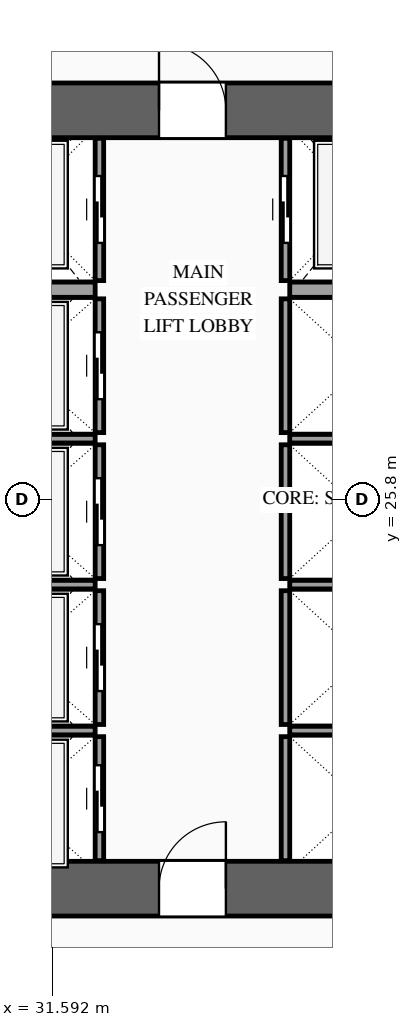
"""IFC4 building model, lengths in metres.
Left out: names, types, materials, properties, quantities, classifications, styles, units other than length and angle.
Written with IfcOpenShell. Run it as: python <this file> out.ifc"""

import sys

from ifc_helpers import new_model, si_unit, direction, frame, frame_2d, origin, place, context, subcontext, project, spatial, rectangle, extrude, source, transform, mapped, element, fill, save


model = new_model("IFC4")
c1 = context("Model", 3, precision=1e-05, world=origin(), true_north=direction((0.0, 1.0)))
c2 = subcontext(c1, "Body", "Model", "MODEL_VIEW")
j1 = project(units=[si_unit("LENGTHUNIT", "METRE"), si_unit("PLANEANGLEUNIT", "RADIAN")], contexts=[c1])
p1 = place(None, origin())
s1 = spatial("IfcSite", under=j1, at=p1, CompositionType="ELEMENT")
p2 = place(p1, origin())
s2 = spatial("IfcBuilding", under=s1, at=p2, CompositionType="ELEMENT")
p3 = place(p2, frame((0.0, 0.0, 34.2)))
s3 = spatial("IfcBuildingStorey", under=s2, at=p3, CompositionType="ELEMENT", Elevation=34.2)
p4 = place(p3, frame((23.35, 19.4, 0.0), z_axis=(0.0, 0.0, 1.0), x_axis=(1.0, 0.0, 0.0)))
e1 = element("IfcWall", 1, at=p4, inside=s3, PredefinedType="SHEAR", context=c2, shape_type="SweptSolid", body=[
    extrude(rectangle(XDim=27.3, YDim=0.9, at=frame_2d((13.65, 0.0))), origin(), (0.0, 0.0, 1.0), 3.6),
])
p5 = place(p4, frame((2.1, 0.0, 0.0)))
e2 = element("IfcOpeningElement", 2, at=p5, cuts=e1, PredefinedType="OPENING", context=c2, shape_type="SweptSolid", body=[
    extrude(rectangle(XDim=1.1, YDim=2.2, at=frame_2d((0.55, 1.1))), frame((0.0, 0.465, 0.0), z_axis=(0.0, -1.0, 0.0), x_axis=(1.0, 0.0, 0.0)), (0.0, 0.0, 1.0), 0.93),
])
p6 = place(p4, frame((10.0, 0.0, 0.0)))
e3 = element("IfcOpeningElement", 3, at=p6, cuts=e1, PredefinedType="OPENING", context=c2, shape_type="SweptSolid", body=[
    extrude(rectangle(XDim=1.1, YDim=2.2, at=frame_2d((0.55, 1.1))), frame((0.0, 0.465, 0.0), z_axis=(0.0, -1.0, 0.0), x_axis=(1.0, 0.0, 0.0)), (0.0, 0.0, 1.0), 0.93),
])
p7 = place(p4, frame((23.2, 0.0, 0.0)))
e4 = element("IfcOpeningElement", 4, at=p7, cuts=e1, PredefinedType="OPENING", context=c2, shape_type="SweptSolid", body=[
    extrude(rectangle(XDim=1.1, YDim=2.2, at=frame_2d((0.55, 1.1))), frame((0.0, 0.465, 0.0), z_axis=(0.0, -1.0, 0.0), x_axis=(1.0, 0.0, 0.0)), (0.0, 0.0, 1.0), 0.93),
])
p8 = place(p4, frame((19.82, 0.0, 0.0)))
e5 = element("IfcOpeningElement", 5, at=p8, cuts=e1, PredefinedType="OPENING", context=c2, shape_type="SweptSolid", body=[
    extrude(rectangle(XDim=0.9, YDim=2.15, at=frame_2d((0.45, 1.075))), frame((0.0, 0.465, 0.0), z_axis=(0.0, -1.0, 0.0), x_axis=(1.0, 0.0, 0.0)), (0.0, 0.0, 1.0), 0.93),
])
p9 = place(p4, frame((18.38, 0.0, 0.0)))
e6 = element("IfcOpeningElement", 6, at=p9, cuts=e1, PredefinedType="OPENING", context=c2, shape_type="SweptSolid", body=[
    extrude(rectangle(XDim=0.9, YDim=2.15, at=frame_2d((0.45, 1.075))), frame((0.0, 0.465, 0.0), z_axis=(0.0, -1.0, 0.0), x_axis=(1.0, 0.0, 0.0)), (0.0, 0.0, 1.0), 0.93),
])
p10 = place(p3, frame((23.35, 32.2, 0.0), z_axis=(0.0, 0.0, 1.0), x_axis=(1.0, 0.0, 0.0)))
e7 = element("IfcWall", 7, at=p10, inside=s3, PredefinedType="SHEAR", context=c2, shape_type="SweptSolid", body=[
    extrude(rectangle(XDim=27.3, YDim=0.9, at=frame_2d((13.65, 0.0))), origin(), (0.0, 0.0, 1.0), 3.6),
])
p11 = place(p10, frame((4.72, 0.0, 0.0)))
e8 = element("IfcOpeningElement", 8, at=p11, cuts=e7, PredefinedType="OPENING", context=c2, shape_type="SweptSolid", body=[
    extrude(rectangle(XDim=0.9, YDim=2.15, at=frame_2d((0.45, 1.075))), frame((0.0, 0.465, 0.0), z_axis=(0.0, -1.0, 0.0), x_axis=(1.0, 0.0, 0.0)), (0.0, 0.0, 1.0), 0.93),
])
p12 = place(p10, frame((10.0, 0.0, 0.0)))
e9 = element("IfcOpeningElement", 9, at=p12, cuts=e7, PredefinedType="OPENING", context=c2, shape_type="SweptSolid", body=[
    extrude(rectangle(XDim=1.1, YDim=2.2, at=frame_2d((0.55, 1.1))), frame((0.0, 0.465, 0.0), z_axis=(0.0, -1.0, 0.0), x_axis=(1.0, 0.0, 0.0)), (0.0, 0.0, 1.0), 0.93),
])
p13 = place(p10, frame((15.85, 0.0, 0.0)))
e10 = element("IfcOpeningElement", 10, at=p13, cuts=e7, PredefinedType="OPENING", context=c2, shape_type="SweptSolid", body=[
    extrude(rectangle(XDim=1.1, YDim=2.2, at=frame_2d((0.55, 1.1))), frame((0.0, 0.465, 0.0), z_axis=(0.0, -1.0, 0.0), x_axis=(1.0, 0.0, 0.0)), (0.0, 0.0, 1.0), 0.93),
])
p14 = place(p3, frame((32.37, 19.86, 0.0), z_axis=(0.0, 0.0, 1.0), x_axis=(0.0, 1.0, 0.0)))
e11 = element("IfcWall", 11, at=p14, inside=s3, PredefinedType="SOLIDWALL", context=c2, shape_type="SweptSolid", body=[
    extrude(rectangle(XDim=2.04, YDim=0.14, at=frame_2d((1.02, 0.0))), origin(), (0.0, 0.0, 1.0), 3.38),
])
p15 = place(p14, frame((0.47, 0.0, 0.0)))
e12 = element("IfcOpeningElement", 12, at=p15, cuts=e11, PredefinedType="OPENING", context=c2, shape_type="SweptSolid", body=[
    extrude(rectangle(XDim=1.1, YDim=2.2, at=frame_2d((0.55, 1.1))), frame((0.0, 0.085, 0.0), z_axis=(0.0, -1.0, 0.0), x_axis=(1.0, 0.0, 0.0)), (0.0, 0.0, 1.0), 0.17),
])
m1 = source(origin(), c2, "Body", "SweptSolid", [
    extrude(rectangle(XDim=2.5, YDim=0.14, at=frame_2d((1.25, 0.0))), origin(), (0.0, 0.0, 1.0), 3.38),
])
p16 = place(p3, frame((29.8, 22.0, 0.0), z_axis=(0.0, 0.0, 1.0), x_axis=(1.0, 0.0, 0.0)))
e13 = element("IfcWall", 13, at=p16, inside=s3, PredefinedType="SOLIDWALL", context=c2, shape_type="MappedRepresentation", body=[
    mapped(m1, transform((0.0, 0.0, 0.0), scale=1.0)),
])
p17 = place(p3, frame((32.37, 22.1, 0.0), z_axis=(0.0, 0.0, 1.0), x_axis=(0.0, 1.0, 0.0)))
e14 = element("IfcWall", 14, at=p17, inside=s3, PredefinedType="SOLIDWALL", context=c2, shape_type="SweptSolid", body=[
    extrude(rectangle(XDim=2.2, YDim=0.14, at=frame_2d((1.1, 0.0))), origin(), (0.0, 0.0, 1.0), 3.38),
])
p18 = place(p17, frame((0.55, 0.0, 0.0)))
e15 = element("IfcOpeningElement", 15, at=p18, cuts=e14, PredefinedType="OPENING", context=c2, shape_type="SweptSolid", body=[
    extrude(rectangle(XDim=1.1, YDim=2.2, at=frame_2d((0.55, 1.1))), frame((0.0, 0.085, 0.0), z_axis=(0.0, -1.0, 0.0), x_axis=(1.0, 0.0, 0.0)), (0.0, 0.0, 1.0), 0.17),
])
p19 = place(p3, frame((29.8, 24.4, 0.0), z_axis=(0.0, 0.0, 1.0), x_axis=(1.0, 0.0, 0.0)))
e16 = element("IfcWall", 16, at=p19, inside=s3, PredefinedType="SOLIDWALL", context=c2, shape_type="MappedRepresentation", body=[
    mapped(m1, transform((0.0, 0.0, 0.0), scale=1.0)),
])
p20 = place(p3, frame((32.37, 24.5, 0.0), z_axis=(0.0, 0.0, 1.0), x_axis=(0.0, 1.0, 0.0)))
e17 = element("IfcWall", 17, at=p20, inside=s3, PredefinedType="SOLIDWALL", context=c2, shape_type="SweptSolid", body=[
    extrude(rectangle(XDim=2.2, YDim=0.14, at=frame_2d((1.1, 0.0))), origin(), (0.0, 0.0, 1.0), 3.38),
])
p21 = place(p20, frame((0.55, 0.0, 0.0)))
e18 = element("IfcOpeningElement", 18, at=p21, cuts=e17, PredefinedType="OPENING", context=c2, shape_type="SweptSolid", body=[
    extrude(rectangle(XDim=1.1, YDim=2.2, at=frame_2d((0.55, 1.1))), frame((0.0, 0.085, 0.0), z_axis=(0.0, -1.0, 0.0), x_axis=(1.0, 0.0, 0.0)), (0.0, 0.0, 1.0), 0.17),
])
p22 = place(p3, frame((29.8, 26.8, 0.0), z_axis=(0.0, 0.0, 1.0), x_axis=(1.0, 0.0, 0.0)))
e19 = element("IfcWall", 19, at=p22, inside=s3, PredefinedType="SOLIDWALL", context=c2, shape_type="MappedRepresentation", body=[
    mapped(m1, transform((0.0, 0.0, 0.0), scale=1.0)),
])
p23 = place(p3, frame((32.37, 26.9, 0.0), z_axis=(0.0, 0.0, 1.0), x_axis=(0.0, 1.0, 0.0)))
e20 = element("IfcWall", 20, at=p23, inside=s3, PredefinedType="SOLIDWALL", context=c2, shape_type="SweptSolid", body=[
    extrude(rectangle(XDim=2.2, YDim=0.14, at=frame_2d((1.1, 0.0))), origin(), (0.0, 0.0, 1.0), 3.38),
])
p24 = place(p23, frame((0.55, 0.0, 0.0)))
e21 = element("IfcOpeningElement", 21, at=p24, cuts=e20, PredefinedType="OPENING", context=c2, shape_type="SweptSolid", body=[
    extrude(rectangle(XDim=1.1, YDim=2.2, at=frame_2d((0.55, 1.1))), frame((0.0, 0.085, 0.0), z_axis=(0.0, -1.0, 0.0), x_axis=(1.0, 0.0, 0.0)), (0.0, 0.0, 1.0), 0.17),
])
p25 = place(p3, frame((32.37, 29.4, 0.0), z_axis=(0.0, 0.0, 1.0), x_axis=(0.0, 1.0, 0.0)))
e22 = element("IfcWall", 22, at=p25, inside=s3, PredefinedType="SOLIDWALL", context=c2, shape_type="SweptSolid", body=[
    extrude(rectangle(XDim=2.34, YDim=0.14, at=frame_2d((1.17, 0.0))), origin(), (0.0, 0.0, 1.0), 3.38),
])
p26 = place(p25, frame((0.62, 0.0, 0.0)))
e23 = element("IfcOpeningElement", 23, at=p26, cuts=e22, PredefinedType="OPENING", context=c2, shape_type="SweptSolid", body=[
    extrude(rectangle(XDim=1.1, YDim=2.2, at=frame_2d((0.55, 1.1))), frame((0.0, 0.085, 0.0), z_axis=(0.0, -1.0, 0.0), x_axis=(1.0, 0.0, 0.0)), (0.0, 0.0, 1.0), 0.17),
])
m2 = source(origin(), c2, "Body", "SweptSolid", [
    extrude(rectangle(XDim=2.5, YDim=0.25, at=frame_2d((1.25, 0.0))), origin(), (0.0, 0.0, 1.0), 3.38),
])
p27 = place(p3, frame((29.8, 29.25, 0.0), z_axis=(0.0, 0.0, 1.0), x_axis=(1.0, 0.0, 0.0)))
e24 = element("IfcWall", 24, at=p27, inside=s3, PredefinedType="SOLIDWALL", context=c2, shape_type="MappedRepresentation", body=[
    mapped(m2, transform((0.0, 0.0, 0.0), scale=1.0)),
])
m3 = source(origin(), c2, "Body", "SweptSolid", [
    extrude(rectangle(XDim=2.04, YDim=0.14, at=frame_2d((1.02, 0.0))), origin(), (0.0, 0.0, 1.0), 3.38),
])
p28 = place(p3, frame((35.43, 19.86, 0.0), z_axis=(0.0, 0.0, 1.0), x_axis=(0.0, 1.0, 0.0)))
e25 = element("IfcWall", 25, at=p28, inside=s3, PredefinedType="SOLIDWALL", context=c2, shape_type="MappedRepresentation", body=[
    mapped(m3, transform((0.0, 0.0, 0.0), scale=1.0)),
])
m4 = source(origin(), c2, "Body", "SweptSolid", [
    extrude(rectangle(XDim=2.4, YDim=0.14, at=frame_2d((1.2, 0.0))), origin(), (0.0, 0.0, 1.0), 3.38),
])
p29 = place(p3, frame((35.5, 22.0, 0.0), z_axis=(0.0, 0.0, 1.0), x_axis=(1.0, 0.0, 0.0)))
e26 = element("IfcWall", 26, at=p29, inside=s3, PredefinedType="SOLIDWALL", context=c2, shape_type="MappedRepresentation", body=[
    mapped(m4, transform((0.0, 0.0, 0.0), scale=1.0)),
])
m5 = source(origin(), c2, "Body", "SweptSolid", [
    extrude(rectangle(XDim=2.2, YDim=0.14, at=frame_2d((1.1, 0.0))), origin(), (0.0, 0.0, 1.0), 3.38),
])
p30 = place(p3, frame((35.43, 22.1, 0.0), z_axis=(0.0, 0.0, 1.0), x_axis=(0.0, 1.0, 0.0)))
e27 = element("IfcWall", 27, at=p30, inside=s3, PredefinedType="SOLIDWALL", context=c2, shape_type="MappedRepresentation", body=[
    mapped(m5, transform((0.0, 0.0, 0.0), scale=1.0)),
])
p31 = place(p3, frame((35.5, 24.4, 0.0), z_axis=(0.0, 0.0, 1.0), x_axis=(1.0, 0.0, 0.0)))
e28 = element("IfcWall", 28, at=p31, inside=s3, PredefinedType="SOLIDWALL", context=c2, shape_type="MappedRepresentation", body=[
    mapped(m4, transform((0.0, 0.0, 0.0), scale=1.0)),
])
p32 = place(p3, frame((35.43, 24.5, 0.0), z_axis=(0.0, 0.0, 1.0), x_axis=(0.0, 1.0, 0.0)))
e29 = element("IfcWall", 29, at=p32, inside=s3, PredefinedType="SOLIDWALL", context=c2, shape_type="MappedRepresentation", body=[
    mapped(m5, transform((0.0, 0.0, 0.0), scale=1.0)),
])
p33 = place(p3, frame((35.5, 26.8, 0.0), z_axis=(0.0, 0.0, 1.0), x_axis=(1.0, 0.0, 0.0)))
e30 = element("IfcWall", 30, at=p33, inside=s3, PredefinedType="SOLIDWALL", context=c2, shape_type="MappedRepresentation", body=[
    mapped(m4, transform((0.0, 0.0, 0.0), scale=1.0)),
])
m6 = source(origin(), c2, "Body", "SweptSolid", [
    extrude(rectangle(XDim=2.2, YDim=0.14, at=frame_2d((1.1, 0.0))), origin(), (0.0, 0.0, 1.0), 3.38),
])
p34 = place(p3, frame((35.43, 26.9, 0.0), z_axis=(0.0, 0.0, 1.0), x_axis=(0.0, 1.0, 0.0)))
e31 = element("IfcWall", 31, at=p34, inside=s3, PredefinedType="SOLIDWALL", context=c2, shape_type="MappedRepresentation", body=[
    mapped(m6, transform((0.0, 0.0, 0.0), scale=1.0)),
])
p35 = place(p3, frame((35.43, 29.4, 0.0), z_axis=(0.0, 0.0, 1.0), x_axis=(0.0, 1.0, 0.0)))
e32 = element("IfcWall", 32, at=p35, inside=s3, PredefinedType="SOLIDWALL", context=c2, shape_type="SweptSolid", body=[
    extrude(rectangle(XDim=2.34, YDim=0.14, at=frame_2d((1.17, 0.0))), origin(), (0.0, 0.0, 1.0), 3.38),
])
p36 = place(p35, frame((0.62, 0.0, 0.0)))
e33 = element("IfcOpeningElement", 33, at=p36, cuts=e32, PredefinedType="OPENING", context=c2, shape_type="SweptSolid", body=[
    extrude(rectangle(XDim=1.1, YDim=2.2, at=frame_2d((0.55, 1.1))), frame((0.0, 0.085, 0.0), z_axis=(0.0, -1.0, 0.0), x_axis=(1.0, 0.0, 0.0)), (0.0, 0.0, 1.0), 0.17),
])
m7 = source(origin(), c2, "Body", "SweptSolid", [
    extrude(rectangle(XDim=2.4, YDim=0.25, at=frame_2d((1.2, 0.0))), origin(), (0.0, 0.0, 1.0), 3.38),
])
p37 = place(p3, frame((35.5, 29.25, 0.0), z_axis=(0.0, 0.0, 1.0), x_axis=(1.0, 0.0, 0.0)))
e34 = element("IfcWall", 34, at=p37, inside=s3, PredefinedType="SOLIDWALL", context=c2, shape_type="MappedRepresentation", body=[
    mapped(m7, transform((0.0, 0.0, 0.0), scale=1.0)),
])
m8 = source(origin(), c2, "Body", "SweptSolid", [
    extrude(rectangle(XDim=1.1, YDim=2.2, at=frame_2d((0.55, 1.1))), frame((0.0, 0.025, 0.0), z_axis=(0.0, -1.0, 0.0), x_axis=(1.0, 0.0, 0.0)), (0.0, 0.0, 1.0), 0.05),
])
p38 = place(p15, origin())
e35 = element("IfcDoor", 35, at=p38, inside=s3, OperationType="SLIDING_TO_LEFT", PredefinedType="DOOR", context=c2, shape_type="MappedRepresentation", body=[
    mapped(m8, transform((0.0, 0.0, 0.0), scale=1.0)),
])
fill(e12, e35)
p39 = place(p18, origin())
e36 = element("IfcDoor", 36, at=p39, inside=s3, OperationType="SLIDING_TO_RIGHT", PredefinedType="DOOR", context=c2, shape_type="MappedRepresentation", body=[
    mapped(m8, transform((0.0, 0.0, 0.0), scale=1.0)),
])
fill(e15, e36)
p40 = place(p21, origin())
e37 = element("IfcDoor", 37, at=p40, inside=s3, OperationType="SLIDING_TO_LEFT", PredefinedType="DOOR", context=c2, shape_type="MappedRepresentation", body=[
    mapped(m8, transform((0.0, 0.0, 0.0), scale=1.0)),
])
fill(e18, e37)
p41 = place(p24, origin())
e38 = element("IfcDoor", 38, at=p41, inside=s3, OperationType="SLIDING_TO_RIGHT", PredefinedType="DOOR", context=c2, shape_type="MappedRepresentation", body=[
    mapped(m8, transform((0.0, 0.0, 0.0), scale=1.0)),
])
fill(e21, e38)
p42 = place(p26, origin())
e39 = element("IfcDoor", 39, at=p42, inside=s3, OperationType="SLIDING_TO_LEFT", PredefinedType="DOOR", context=c2, shape_type="MappedRepresentation", body=[
    mapped(m8, transform((0.0, 0.0, 0.0), scale=1.0)),
])
fill(e23, e39)
p43 = place(p36, origin())
e40 = element("IfcDoor", 40, at=p43, inside=s3, OperationType="SLIDING_TO_RIGHT", PredefinedType="DOOR", context=c2, shape_type="MappedRepresentation", body=[
    mapped(m8, transform((0.0, 0.0, 0.0), scale=1.0)),
])
fill(e33, e40)
m9 = source(origin(), c2, "Body", "SweptSolid", [
    extrude(rectangle(XDim=1.1, YDim=2.2, at=frame_2d((0.55, 1.1))), frame((0.0, 0.025, 0.0), z_axis=(0.0, -1.0, 0.0), x_axis=(1.0, 0.0, 0.0)), (0.0, 0.0, 1.0), 0.05),
])
p44 = place(p6, origin())
e41 = element("IfcDoor", 41, at=p44, inside=s3, OperationType="SINGLE_SWING_RIGHT", PredefinedType="DOOR", context=c2, shape_type="MappedRepresentation", body=[
    mapped(m9, transform((0.0, 0.0, 0.0), scale=1.0)),
])
fill(e3, e41)
p45 = place(p12, origin())
e42 = element("IfcDoor", 42, at=p45, inside=s3, OperationType="SINGLE_SWING_LEFT", PredefinedType="DOOR", context=c2, shape_type="MappedRepresentation", body=[
    mapped(m9, transform((0.0, 0.0, 0.0), scale=1.0)),
])
fill(e9, e42)
save(model, sys.argv[1])
